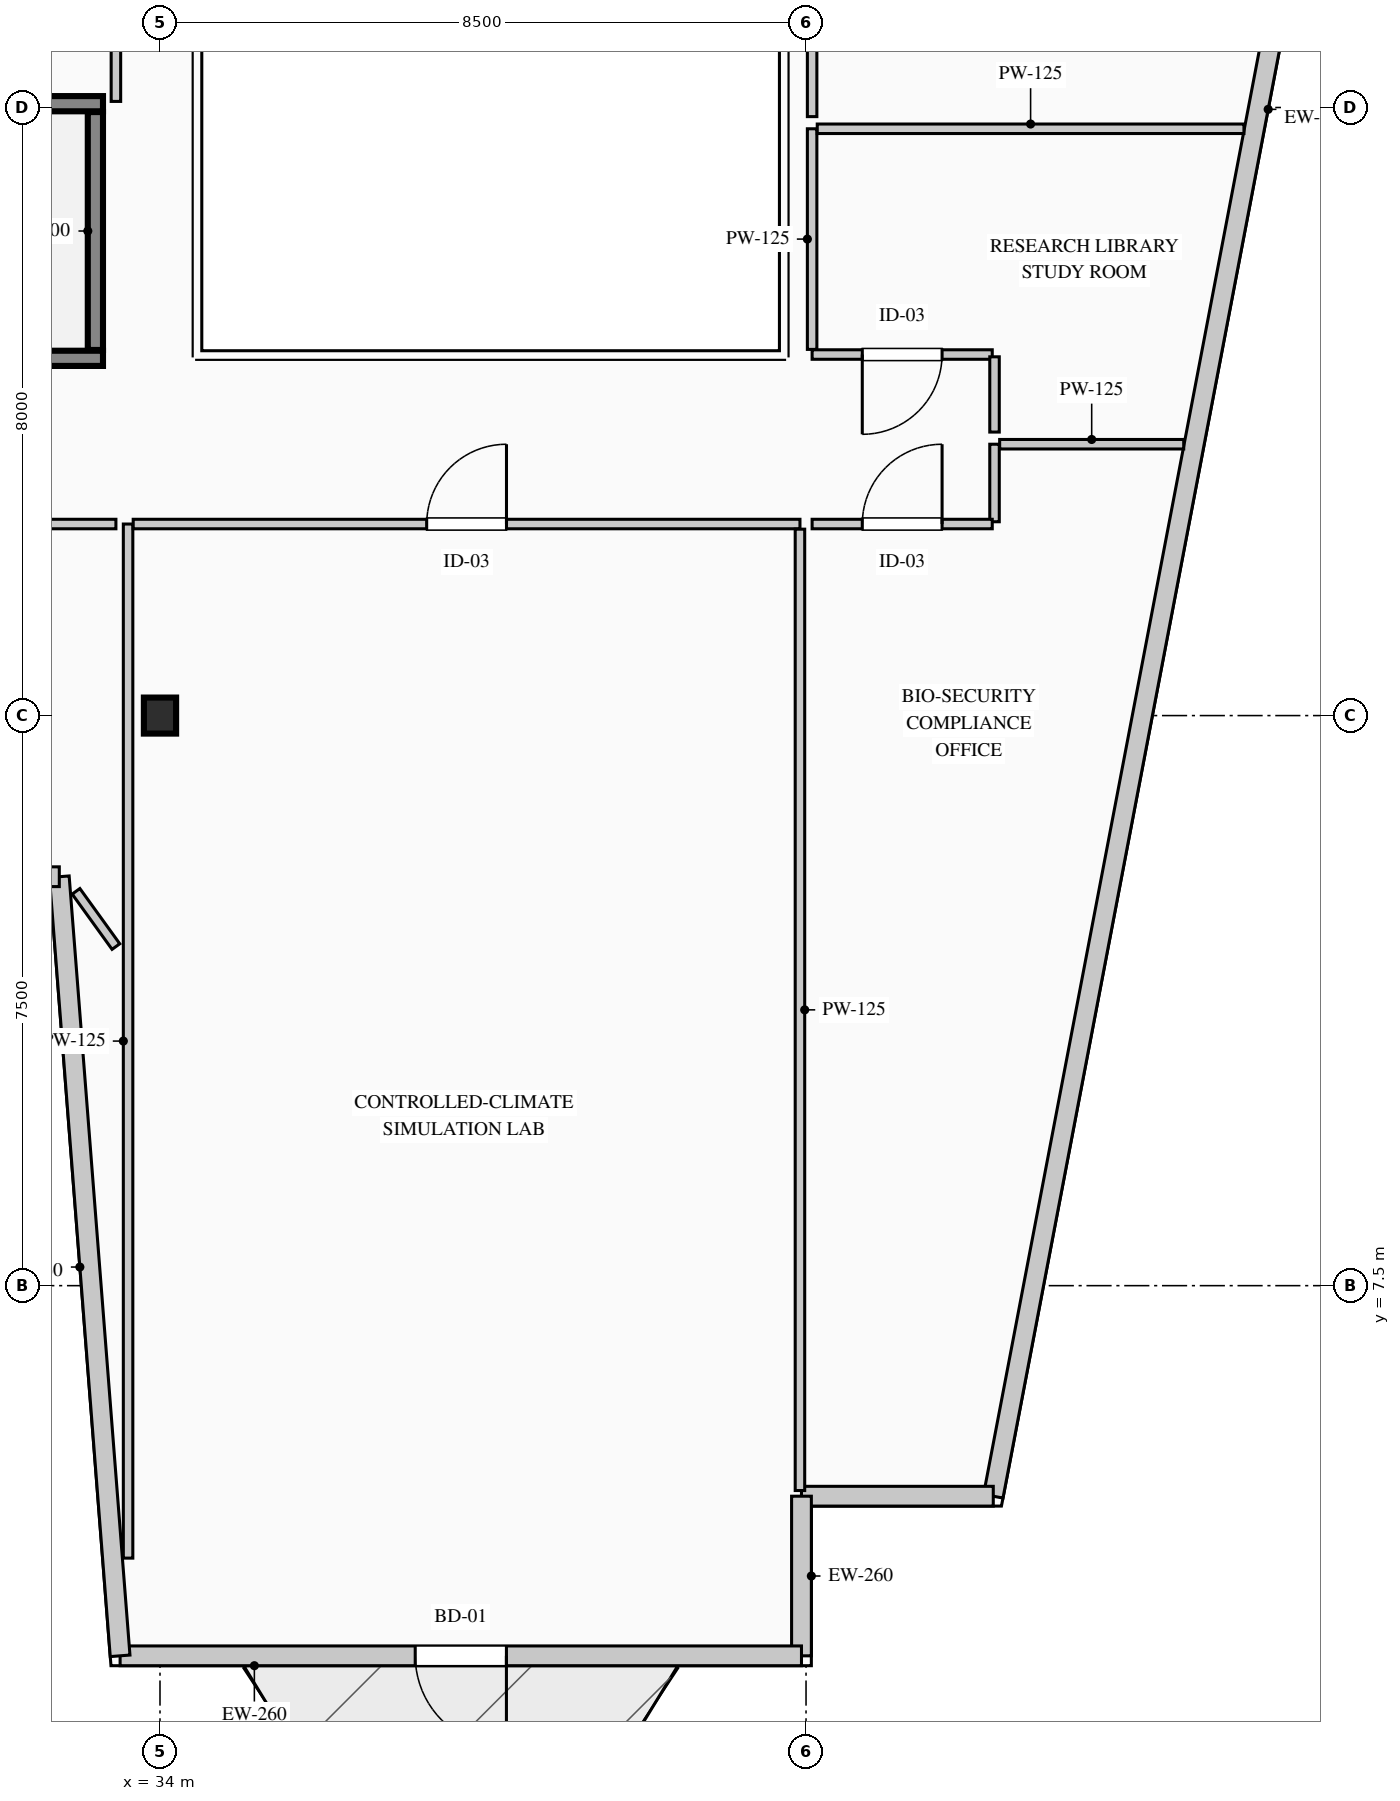
"""IFC4 building model, lengths in metres.
Left out: names, types, materials, properties, quantities, classifications, styles, units other than length and angle.
Written with IfcOpenShell. Run it as: python <this file> out.ifc"""

import sys

from ifc_helpers import new_model, si_unit, direction, frame, frame_2d, origin, origin_2d, place, context, subcontext, project, spatial, rectangle, i_section, extrude, element, fill, save


model = new_model("IFC4")
c1 = context("Model", 3, precision=1e-05, world=origin(), true_north=direction((0.0, 1.0)))
c2 = subcontext(c1, "Body", "Model", "MODEL_VIEW")
j1 = project(units=[si_unit("LENGTHUNIT", "METRE"), si_unit("PLANEANGLEUNIT", "RADIAN")], contexts=[c1])
p1 = place(None, origin())
s1 = spatial("IfcSite", under=j1, at=p1, CompositionType="ELEMENT")
p2 = place(p1, origin())
s2 = spatial("IfcBuilding", under=s1, at=p2, CompositionType="ELEMENT")
p3 = place(p2, frame((0.0, 0.0, 131.15)))
s3 = spatial("IfcBuildingStorey", under=s2, at=p3, CompositionType="ELEMENT", Elevation=131.15)
p4 = place(p3, frame((26.05, 19.7, 0.0), z_axis=(0.0, 0.0, 1.0), x_axis=(1.0, 0.0, 0.0)))
e1 = element("IfcWall", 1, at=p4, inside=s3, PredefinedType="SHEAR", context=c2, shape_type="SweptSolid", body=[
    extrude(rectangle(XDim=7.2, YDim=0.2, at=frame_2d((3.6, 0.0))), origin(), (0.0, 0.0, 1.0), 3.95),
])
p5 = place(p4, frame((0.38, 0.0, 0.0)))
e2 = element("IfcOpeningElement", 2, at=p5, cuts=e1, PredefinedType="OPENING", context=c2, shape_type="SweptSolid", body=[
    extrude(rectangle(XDim=1.15, YDim=2.2, at=frame_2d((0.575, 1.1))), frame((0.0, 0.11, 0.0), z_axis=(0.0, -1.0, 0.0), x_axis=(1.0, 0.0, 0.0)), (0.0, 0.0, 1.0), 0.22),
])
p6 = place(p3, frame((26.05, 23.05, 0.0), z_axis=(0.0, 0.0, 1.0), x_axis=(1.0, 0.0, 0.0)))
e3 = element("IfcWall", 3, at=p6, inside=s3, PredefinedType="SHEAR", context=c2, shape_type="SweptSolid", body=[
    extrude(rectangle(XDim=7.2, YDim=0.2, at=frame_2d((3.6, 0.0))), origin(), (0.0, 0.0, 1.0), 3.95),
])
p7 = place(p3, frame((33.15, 19.81, 0.0), z_axis=(0.0, 0.0, 1.0), x_axis=(0.0, 1.0, 0.0)))
e4 = element("IfcWall", 4, at=p7, inside=s3, PredefinedType="SHEAR", context=c2, shape_type="SweptSolid", body=[
    extrude(rectangle(XDim=3.13, YDim=0.2, at=frame_2d((1.565, 0.0))), origin(), (0.0, 0.0, 1.0), 3.95),
])
p8 = place(p3, frame((34.0, 15.0, 0.0), z_axis=(0.0, 0.0, 1.0), x_axis=(1.0, 0.0, 0.0)))
e5 = element("IfcColumn", 5, at=p8, inside=s3, PredefinedType="COLUMN", context=c2, shape_type="SweptSolid", body=[
    extrude(i_section(OverallWidth=0.424, OverallDepth=0.474, WebThickness=0.048, FlangeThickness=0.077, FilletRadius=0.015, at=origin_2d()), origin(), (0.0, 0.0, 1.0), 3.95),
])
p9 = place(p3, frame((51.942, 41.27, 0.0), z_axis=(0.0, 0.0, 1.0), x_axis=(-0.187592192405, -0.982247000173, 0.0)))
e6 = element("IfcWall", 6, at=p9, inside=s3, PredefinedType="STANDARD", context=c2, shape_type="SweptSolid", body=[
    extrude(rectangle(XDim=37.2, YDim=0.26, at=frame_2d((18.6, 0.0))), origin(), (0.0, 0.0, 1.0), 3.69),
])
p10 = place(p9, frame((12.342, 0.0, 0.9)))
e7 = element("IfcOpeningElement", 7, at=p10, cuts=e6, PredefinedType="OPENING", context=c2, shape_type="SweptSolid", body=[
    extrude(rectangle(XDim=2.1, YDim=2.0, at=frame_2d((1.05, 1.0))), frame((0.0, 0.14, 0.0), z_axis=(0.0, -1.0, 0.0), x_axis=(1.0, 0.0, 0.0)), (0.0, 0.0, 1.0), 0.28),
])
p11 = place(p3, frame((44.963, 4.73, 0.0), z_axis=(0.0, 0.0, 1.0), x_axis=(-1.0, 0.0, 0.0)))
e8 = element("IfcWall", 8, at=p11, inside=s3, PredefinedType="STANDARD", context=c2, shape_type="SweptSolid", body=[
    extrude(rectangle(XDim=2.523, YDim=0.26, at=frame_2d((1.262, 0.0))), origin(), (0.0, 0.0, 1.0), 3.69),
])
p12 = place(p3, frame((42.44, 4.73, 0.0), z_axis=(0.0, 0.0, 1.0), x_axis=(0.0, -1.0, 0.0)))
e9 = element("IfcWall", 9, at=p12, inside=s3, PredefinedType="STANDARD", context=c2, shape_type="SweptSolid", body=[
    extrude(rectangle(XDim=2.1, YDim=0.26, at=frame_2d((1.05, 0.0))), origin(), (0.0, 0.0, 1.0), 3.69),
])
p13 = place(p3, frame((42.44, 2.63, 0.0), z_axis=(0.0, 0.0, 1.0), x_axis=(-1.0, 0.0, 0.0)))
e10 = element("IfcWall", 10, at=p13, inside=s3, PredefinedType="STANDARD", context=c2, shape_type="SweptSolid", body=[
    extrude(rectangle(XDim=8.965, YDim=0.26, at=frame_2d((4.482, 0.0))), origin(), (0.0, 0.0, 1.0), 3.69),
])
p14 = place(p13, frame((3.882, 0.0, 0.0)))
e11 = element("IfcOpeningElement", 11, at=p14, cuts=e10, PredefinedType="OPENING", context=c2, shape_type="SweptSolid", body=[
    extrude(rectangle(XDim=1.2, YDim=2.2, at=frame_2d((0.6, 1.1))), frame((0.0, 0.14, 0.0), z_axis=(0.0, -1.0, 0.0), x_axis=(1.0, 0.0, 0.0)), (0.0, 0.0, 1.0), 0.28),
])
p15 = place(p3, frame((33.475, 2.63, 0.0), z_axis=(0.0, 0.0, 1.0), x_axis=(-0.077793257511, 0.996969512616, 0.0)))
e12 = element("IfcWall", 12, at=p15, inside=s3, PredefinedType="STANDARD", context=c2, shape_type="SweptSolid", body=[
    extrude(rectangle(XDim=10.281, YDim=0.26, at=frame_2d((5.141, 0.0))), origin(), (0.0, 0.0, 1.0), 3.69),
])
p16 = place(p3, frame((32.675, 12.88, 0.0), z_axis=(0.0, 0.0, 1.0), x_axis=(-1.0, 0.0, 0.0)))
e13 = element("IfcWall", 13, at=p16, inside=s3, PredefinedType="STANDARD", context=c2, shape_type="SweptSolid", body=[
    extrude(rectangle(XDim=7.765, YDim=0.26, at=frame_2d((3.883, 0.0))), origin(), (0.0, 0.0, 1.0), 3.69),
])
p17 = place(p16, frame((2.983, 0.0, 0.9)))
e14 = element("IfcOpeningElement", 14, at=p17, cuts=e13, PredefinedType="OPENING", context=c2, shape_type="SweptSolid", body=[
    extrude(rectangle(XDim=1.8, YDim=2.1, at=frame_2d((0.9, 1.05))), frame((0.0, 0.14, 0.0), z_axis=(0.0, -1.0, 0.0), x_axis=(1.0, 0.0, 0.0)), (0.0, 0.0, 1.0), 0.28),
])
p18 = place(p3, frame((33.58, 3.915, 0.0), z_axis=(0.0, 0.0, 1.0), x_axis=(0.0, 1.0, 0.0)))
e15 = element("IfcWall", 15, at=p18, inside=s3, PredefinedType="PARTITIONING", context=c2, shape_type="SweptSolid", body=[
    extrude(rectangle(XDim=13.605, YDim=0.125, at=frame_2d((6.802, 0.0))), origin(), (0.0, 0.0, 1.0), 3.69),
])
p19 = place(p3, frame((33.647, 17.52, 0.0), z_axis=(0.0, 0.0, 1.0), x_axis=(1.0, 0.0, 0.0)))
e16 = element("IfcWall", 16, at=p19, inside=s3, PredefinedType="PARTITIONING", context=c2, shape_type="SweptSolid", body=[
    extrude(rectangle(XDim=8.772, YDim=0.125, at=frame_2d((4.386, 0.0))), origin(), (0.0, 0.0, 1.0), 3.375),
])
p20 = place(p19, frame((3.861, 0.0, 0.0)))
e17 = element("IfcOpeningElement", 17, at=p20, cuts=e16, PredefinedType="OPENING", context=c2, shape_type="SweptSolid", body=[
    extrude(rectangle(XDim=1.05, YDim=2.15, at=frame_2d((0.525, 1.075))), frame((0.0, 0.073, 0.0), z_axis=(0.0, -1.0, 0.0), x_axis=(1.0, 0.0, 0.0)), (0.0, 0.0, 1.0), 0.145),
])
p21 = place(p3, frame((42.42, 17.452, 0.0), z_axis=(0.0, 0.0, 1.0), x_axis=(0.0, -1.0, 0.0)))
e18 = element("IfcWall", 18, at=p21, inside=s3, PredefinedType="PARTITIONING", context=c2, shape_type="SweptSolid", body=[
    extrude(rectangle(XDim=12.648, YDim=0.125, at=frame_2d((6.324, 0.0))), origin(), (0.0, 0.0, 1.0), 3.69),
])
p22 = place(p3, frame((44.98, 17.55, 0.0), z_axis=(0.0, 0.0, 1.0), x_axis=(0.0, 1.0, 0.0)))
e19 = element("IfcWall", 19, at=p22, inside=s3, PredefinedType="PARTITIONING", context=c2, shape_type="SweptSolid", body=[
    extrude(rectangle(XDim=1.02, YDim=0.125, at=frame_2d((0.51, 0.0))), origin(), (0.0, 0.0, 1.0), 3.69),
])
p23 = place(p3, frame((45.048, 18.57, 0.0), z_axis=(0.0, 0.0, 1.0), x_axis=(1.0, 0.0, 0.0)))
e20 = element("IfcWall", 20, at=p23, inside=s3, PredefinedType="PARTITIONING", context=c2, shape_type="SweptSolid", body=[
    extrude(rectangle(XDim=2.422, YDim=0.125, at=frame_2d((1.211, 0.0))), origin(), (0.0, 0.0, 1.0), 3.69),
])
p24 = place(p3, frame((42.58, 17.52, 0.0), z_axis=(0.0, 0.0, 1.0), x_axis=(1.0, 0.0, 0.0)))
e21 = element("IfcWall", 21, at=p24, inside=s3, PredefinedType="PARTITIONING", context=c2, shape_type="SweptSolid", body=[
    extrude(rectangle(XDim=2.37, YDim=0.125, at=frame_2d((1.185, 0.0))), origin(), (0.0, 0.0, 1.0), 3.69),
])
p25 = place(p24, frame((0.66, 0.0, 0.0)))
e22 = element("IfcOpeningElement", 22, at=p25, cuts=e21, PredefinedType="OPENING", context=c2, shape_type="SweptSolid", body=[
    extrude(rectangle(XDim=1.05, YDim=2.15, at=frame_2d((0.525, 1.075))), frame((0.0, 0.073, 0.0), z_axis=(0.0, -1.0, 0.0), x_axis=(1.0, 0.0, 0.0)), (0.0, 0.0, 1.0), 0.145),
])
p26 = place(p3, frame((33.42, 11.961, 0.0), z_axis=(0.0, 0.0, 1.0), x_axis=(-0.58517236533, 0.810908936228, 0.0)))
e23 = element("IfcWall", 23, at=p26, inside=s3, PredefinedType="PARTITIONING", context=c2, shape_type="SweptSolid", body=[
    extrude(rectangle(XDim=0.896, YDim=0.125, at=frame_2d((0.448, 0.0))), origin(), (0.0, 0.0, 1.0), 3.69),
])
p27 = place(p3, frame((23.58, 17.52, 0.0), z_axis=(0.0, 0.0, 1.0), x_axis=(1.0, 0.0, 0.0)))
e24 = element("IfcWall", 24, at=p27, inside=s3, PredefinedType="PARTITIONING", context=c2, shape_type="SweptSolid", body=[
    extrude(rectangle(XDim=9.84, YDim=0.125, at=frame_2d((4.92, 0.0))), origin(), (0.0, 0.0, 1.0), 3.375),
])
p28 = place(p27, frame((4.395, 0.0, 0.0)))
e25 = element("IfcOpeningElement", 25, at=p28, cuts=e24, PredefinedType="OPENING", context=c2, shape_type="SweptSolid", body=[
    extrude(rectangle(XDim=1.05, YDim=2.15, at=frame_2d((0.525, 1.075))), frame((0.0, 0.073, 0.0), z_axis=(0.0, -1.0, 0.0), x_axis=(1.0, 0.0, 0.0)), (0.0, 0.0, 1.0), 0.145),
])
p29 = place(p3, frame((44.95, 19.75, 0.0), z_axis=(0.0, 0.0, 1.0), x_axis=(-1.0, 0.0, 0.0)))
e26 = element("IfcWall", 26, at=p29, inside=s3, PredefinedType="PARTITIONING", context=c2, shape_type="SweptSolid", body=[
    extrude(rectangle(XDim=2.37, YDim=0.125, at=frame_2d((1.185, 0.0))), origin(), (0.0, 0.0, 1.0), 3.69),
])
p30 = place(p29, frame((0.66, 0.0, 0.0)))
e27 = element("IfcOpeningElement", 27, at=p30, cuts=e26, PredefinedType="OPENING", context=c2, shape_type="SweptSolid", body=[
    extrude(rectangle(XDim=1.05, YDim=2.15, at=frame_2d((0.525, 1.075))), frame((0.0, 0.073, 0.0), z_axis=(0.0, -1.0, 0.0), x_axis=(1.0, 0.0, 0.0)), (0.0, 0.0, 1.0), 0.145),
])
p31 = place(p3, frame((42.58, 19.817, 0.0), z_axis=(0.0, 0.0, 1.0), x_axis=(0.0, 1.0, 0.0)))
e28 = element("IfcWall", 28, at=p31, inside=s3, PredefinedType="PARTITIONING", context=c2, shape_type="SweptSolid", body=[
    extrude(rectangle(XDim=2.903, YDim=0.125, at=frame_2d((1.451, 0.0))), origin(), (0.0, 0.0, 1.0), 3.69),
])
p32 = place(p3, frame((42.647, 22.72, 0.0), z_axis=(0.0, 0.0, 1.0), x_axis=(1.0, 0.0, 0.0)))
e29 = element("IfcWall", 29, at=p32, inside=s3, PredefinedType="PARTITIONING", context=c2, shape_type="SweptSolid", body=[
    extrude(rectangle(XDim=5.614, YDim=0.125, at=frame_2d((2.807, 0.0))), origin(), (0.0, 0.0, 1.0), 3.69),
])
p33 = place(p3, frame((44.98, 18.73, 0.0), z_axis=(0.0, 0.0, 1.0), x_axis=(0.0, 1.0, 0.0)))
e30 = element("IfcWall", 30, at=p33, inside=s3, PredefinedType="PARTITIONING", context=c2, shape_type="SweptSolid", body=[
    extrude(rectangle(XDim=0.99, YDim=0.125, at=frame_2d((0.495, 0.0))), origin(), (0.0, 0.0, 1.0), 3.69),
])
p34 = place(p3, frame((33.42, 28.502, 0.0), z_axis=(0.0, 0.0, 1.0), x_axis=(0.0, -1.0, 0.0)))
e31 = element("IfcWall", 31, at=p34, inside=s3, PredefinedType="PARTITIONING", context=c2, shape_type="SweptSolid", body=[
    extrude(rectangle(XDim=5.422, YDim=0.125, at=frame_2d((2.711, 0.0))), origin(), (0.0, 0.0, 1.0), 3.69),
])
p35 = place(p3, frame((42.58, 22.88, 0.0), z_axis=(0.0, 0.0, 1.0), x_axis=(0.0, 1.0, 0.0)))
e32 = element("IfcWall", 32, at=p35, inside=s3, PredefinedType="PARTITIONING", context=c2, shape_type="SweptSolid", body=[
    extrude(rectangle(XDim=5.729, YDim=0.125, at=frame_2d((2.865, 0.0))), origin(), (0.0, 0.0, 1.0), 3.69),
])
p36 = place(p14, origin())
e33 = element("IfcDoor", 33, at=p36, inside=s3, OperationType="SINGLE_SWING_LEFT", PredefinedType="DOOR", context=c2, shape_type="SweptSolid", body=[
    extrude(rectangle(XDim=1.2, YDim=2.2, at=frame_2d((0.6, 1.1))), frame((0.0, 0.025, 0.0), z_axis=(0.0, -1.0, 0.0), x_axis=(1.0, 0.0, 0.0)), (0.0, 0.0, 1.0), 0.05),
])
fill(e11, e33)
p37 = place(p20, origin())
e34 = element("IfcDoor", 34, at=p37, inside=s3, OperationType="SINGLE_SWING_RIGHT", PredefinedType="DOOR", context=c2, shape_type="SweptSolid", body=[
    extrude(rectangle(XDim=1.05, YDim=2.15, at=frame_2d((0.525, 1.075))), frame((0.0, 0.025, 0.0), z_axis=(0.0, -1.0, 0.0), x_axis=(1.0, 0.0, 0.0)), (0.0, 0.0, 1.0), 0.05),
])
fill(e17, e34)
p38 = place(p25, origin())
e35 = element("IfcDoor", 35, at=p38, inside=s3, OperationType="SINGLE_SWING_RIGHT", PredefinedType="DOOR", context=c2, shape_type="SweptSolid", body=[
    extrude(rectangle(XDim=1.05, YDim=2.15, at=frame_2d((0.525, 1.075))), frame((0.0, 0.025, 0.0), z_axis=(0.0, -1.0, 0.0), x_axis=(1.0, 0.0, 0.0)), (0.0, 0.0, 1.0), 0.05),
])
fill(e22, e35)
p39 = place(p30, origin())
e36 = element("IfcDoor", 36, at=p39, inside=s3, OperationType="SINGLE_SWING_RIGHT", PredefinedType="DOOR", context=c2, shape_type="SweptSolid", body=[
    extrude(rectangle(XDim=1.05, YDim=2.15, at=frame_2d((0.525, 1.075))), frame((0.0, 0.025, 0.0), z_axis=(0.0, -1.0, 0.0), x_axis=(1.0, 0.0, 0.0)), (0.0, 0.0, 1.0), 0.05),
])
fill(e27, e36)
save(model, sys.argv[1])
